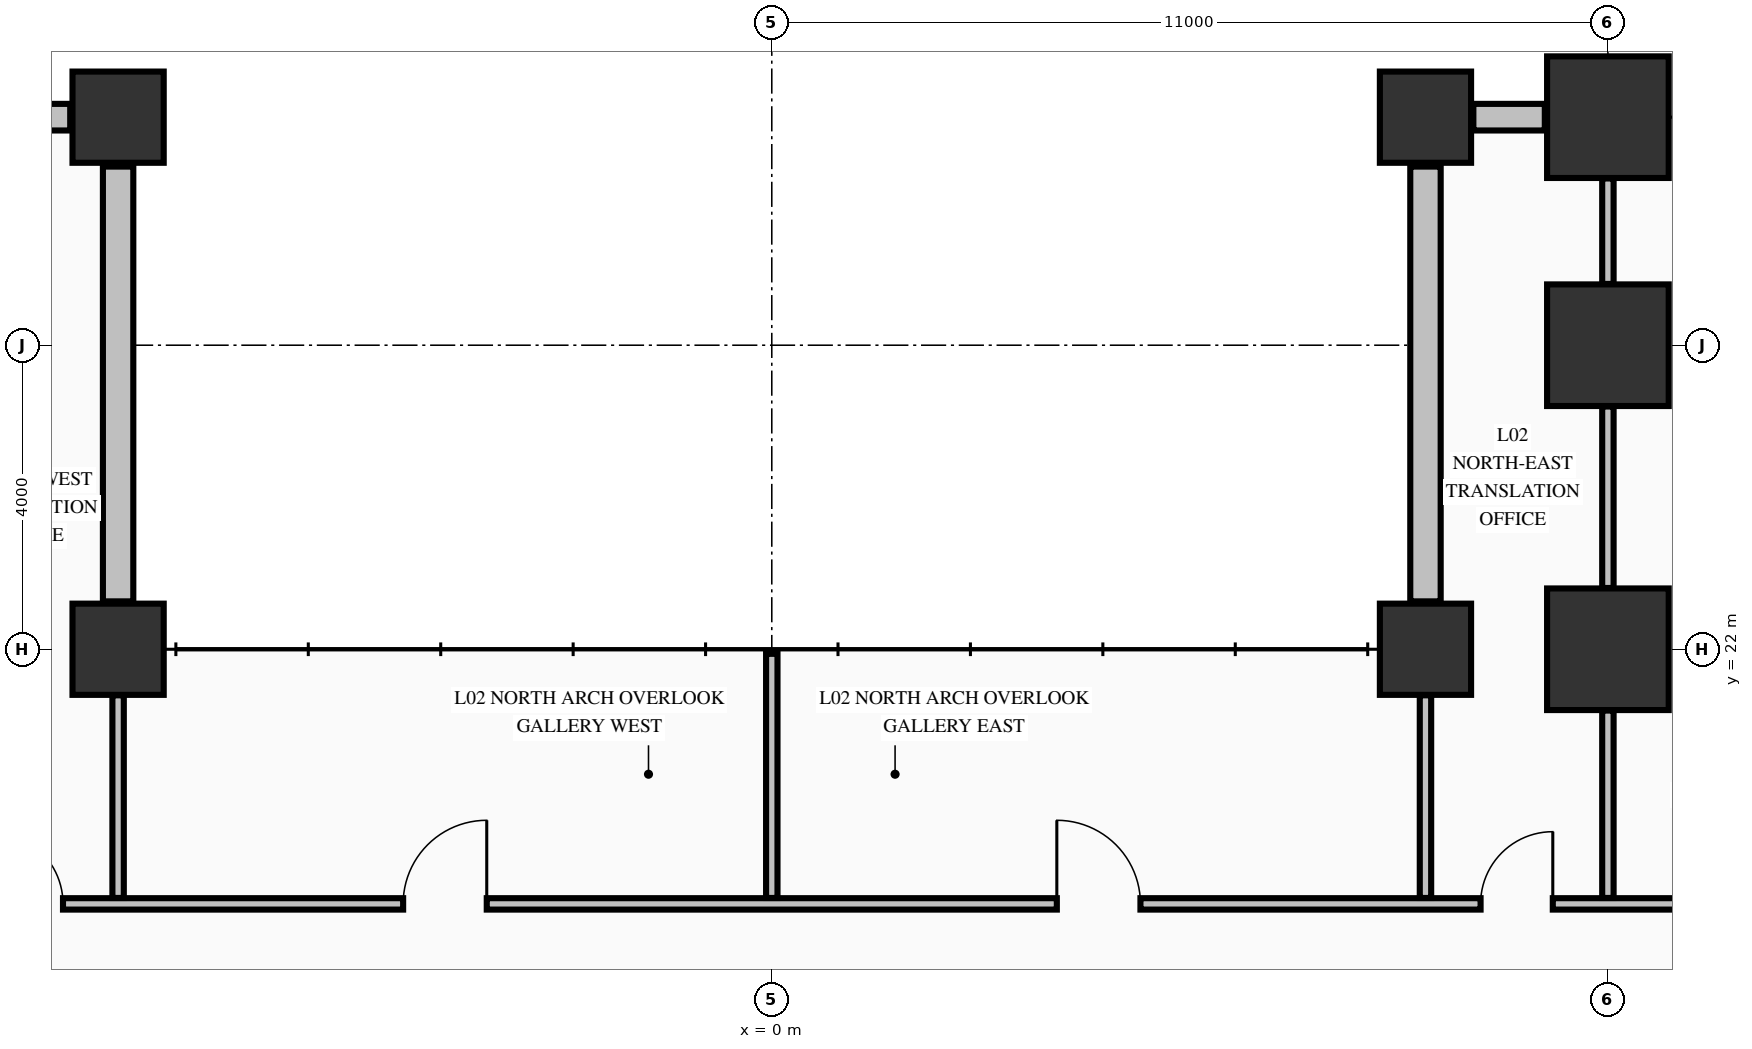
"""IFC4 building model, lengths in metres.
Left out: names, types, materials, properties, quantities, classifications, styles, units other than length and angle.
Written with IfcOpenShell. Run it as: python <this file> out.ifc"""

import sys

from ifc_helpers import new_model, si_unit, direction, frame, frame_2d, origin, origin_2d, place, context, subcontext, project, spatial, rectangle, extrude, element, fill, save


model = new_model("IFC4")
c1 = context("Model", 3, precision=1e-05, world=origin(), true_north=direction((0.0, 1.0)))
c2 = subcontext(c1, "Body", "Model", "MODEL_VIEW")
j1 = project(units=[si_unit("LENGTHUNIT", "METRE"), si_unit("PLANEANGLEUNIT", "RADIAN")], contexts=[c1])
p1 = place(None, origin())
s1 = spatial("IfcSite", under=j1, at=p1, CompositionType="ELEMENT")
p2 = place(p1, origin())
s2 = spatial("IfcBuilding", under=s1, at=p2, CompositionType="ELEMENT")
p3 = place(p2, frame((0.0, 0.0, 10.88)))
s3 = spatial("IfcBuildingStorey", under=s2, at=p3, CompositionType="ELEMENT", Elevation=10.88)
for number, where, z_axis, x_axis in (
    (1, (11.0, 22.0, 0.0), (0.0, 0.0, 1.0), (1.0, 0.0, 0.0)),
    (2, (11.0, 26.0, 0.0), (0.0, 0.0, 1.0), (1.0, 0.0, 0.0)),
    (3, (11.0, 29.0, 0.0), (0.0, 0.0, 1.0), (1.0, 0.0, 0.0)),
):
    element("IfcColumn", number, at=place(p3, frame(where, z_axis=z_axis, x_axis=x_axis)), inside=s3, PredefinedType="COLUMN", context=c2, shape_type="SweptSolid", body=[
        extrude(rectangle(XDim=1.6, YDim=1.6, at=origin_2d()), origin(), (0.0, 0.0, 1.0), 5.09),
    ])
for number, where, z_axis, x_axis in (
    (4, (-8.6, 22.0, 0.0), (0.0, 0.0, 1.0), (1.0, 0.0, 0.0)),
    (5, (8.6, 22.0, 0.0), (0.0, 0.0, 1.0), (1.0, 0.0, 0.0)),
    (6, (-8.6, 29.0, 0.0), (0.0, 0.0, 1.0), (1.0, 0.0, 0.0)),
    (7, (8.6, 29.0, 0.0), (0.0, 0.0, 1.0), (1.0, 0.0, 0.0)),
):
    element("IfcColumn", number, at=place(p3, frame(where, z_axis=z_axis, x_axis=x_axis)), inside=s3, PredefinedType="COLUMN", context=c2, shape_type="SweptSolid", body=[
        extrude(rectangle(XDim=1.2, YDim=1.2, at=origin_2d()), origin(), (0.0, 0.0, 1.0), 5.09),
    ])
for number, where, z_axis, x_axis in (
    (8, (-9.23, 29.0, 0.0), (0.0, 0.0, 1.0), (-1.0, 0.0, 0.0)),
    (9, (10.17, 29.0, 0.0), (0.0, 0.0, 1.0), (-1.0, 0.0, 0.0)),
):
    element("IfcWall", number, at=place(p3, frame(where, z_axis=z_axis, x_axis=x_axis)), inside=s3, PredefinedType="STANDARD", context=c2, shape_type="SweptSolid", body=[
        extrude(rectangle(XDim=0.94, YDim=0.35, at=frame_2d((0.47, 0.0))), origin(), (0.0, 0.0, 1.0), 4.482),
    ])
for number, where, z_axis, x_axis in (
    (10, (-8.6, 22.63, 0.0), (0.0, 0.0, 1.0), (0.0, 1.0, 0.0)),
    (11, (8.6, 28.35, 0.0), (0.0, 0.0, 1.0), (0.0, -1.0, 0.0)),
):
    element("IfcWall", number, at=place(p3, frame(where, z_axis=z_axis, x_axis=x_axis)), inside=s3, PredefinedType="STANDARD", context=c2, shape_type="SweptSolid", body=[
        extrude(rectangle(XDim=5.72, YDim=0.4, at=frame_2d((2.86, 0.0))), origin(), (0.0, 0.0, 1.0), 4.132),
    ])
p4 = place(p3, frame((-33.835, 18.65, 0.0), z_axis=(0.0, 0.0, 1.0), x_axis=(1.0, 0.0, 0.0)))
e12 = element("IfcWall", 12, at=p4, inside=s3, PredefinedType="PARTITIONING", context=c2, shape_type="SweptSolid", body=[
    extrude(rectangle(XDim=63.685, YDim=0.15, at=frame_2d((31.843, 0.0))), origin(), (0.0, 0.0, 1.0), 5.09),
])
p5 = place(p4, frame((1.285, 0.0, 0.0)))
e13 = element("IfcOpeningElement", 13, at=p5, cuts=e12, PredefinedType="OPENING", context=c2, shape_type="SweptSolid", body=[
    extrude(rectangle(XDim=1.1, YDim=2.15, at=frame_2d((0.55, 1.075))), frame((0.0, 0.085, 0.0), z_axis=(0.0, -1.0, 0.0), x_axis=(1.0, 0.0, 0.0)), (0.0, 0.0, 1.0), 0.17),
])
p6 = place(p4, frame((5.285, 0.0, 0.0)))
e14 = element("IfcOpeningElement", 14, at=p6, cuts=e12, PredefinedType="OPENING", context=c2, shape_type="SweptSolid", body=[
    extrude(rectangle(XDim=1.1, YDim=2.15, at=frame_2d((0.55, 1.075))), frame((0.0, 0.085, 0.0), z_axis=(0.0, -1.0, 0.0), x_axis=(1.0, 0.0, 0.0)), (0.0, 0.0, 1.0), 0.17),
])
p7 = place(p4, frame((10.285, 0.0, 0.0)))
e15 = element("IfcOpeningElement", 15, at=p7, cuts=e12, PredefinedType="OPENING", context=c2, shape_type="SweptSolid", body=[
    extrude(rectangle(XDim=1.1, YDim=2.15, at=frame_2d((0.55, 1.075))), frame((0.0, 0.085, 0.0), z_axis=(0.0, -1.0, 0.0), x_axis=(1.0, 0.0, 0.0)), (0.0, 0.0, 1.0), 0.17),
])
p8 = place(p4, frame((15.535, 0.0, 0.0)))
e16 = element("IfcOpeningElement", 16, at=p8, cuts=e12, PredefinedType="OPENING", context=c2, shape_type="SweptSolid", body=[
    extrude(rectangle(XDim=1.1, YDim=2.15, at=frame_2d((0.55, 1.075))), frame((0.0, 0.085, 0.0), z_axis=(0.0, -1.0, 0.0), x_axis=(1.0, 0.0, 0.0)), (0.0, 0.0, 1.0), 0.17),
])
p9 = place(p4, frame((20.035, 0.0, 0.0)))
e17 = element("IfcOpeningElement", 17, at=p9, cuts=e12, PredefinedType="OPENING", context=c2, shape_type="SweptSolid", body=[
    extrude(rectangle(XDim=1.1, YDim=2.15, at=frame_2d((0.55, 1.075))), frame((0.0, 0.085, 0.0), z_axis=(0.0, -1.0, 0.0), x_axis=(1.0, 0.0, 0.0)), (0.0, 0.0, 1.0), 0.17),
])
p10 = place(p4, frame((23.56, 0.0, 0.0)))
e18 = element("IfcOpeningElement", 18, at=p10, cuts=e12, PredefinedType="OPENING", context=c2, shape_type="SweptSolid", body=[
    extrude(rectangle(XDim=0.95, YDim=2.15, at=frame_2d((0.475, 1.075))), frame((0.0, 0.085, 0.0), z_axis=(0.0, -1.0, 0.0), x_axis=(1.0, 0.0, 0.0)), (0.0, 0.0, 1.0), 0.17),
])
p11 = place(p4, frame((28.985, 0.0, 0.0)))
e19 = element("IfcOpeningElement", 19, at=p11, cuts=e12, PredefinedType="OPENING", context=c2, shape_type="SweptSolid", body=[
    extrude(rectangle(XDim=1.1, YDim=2.15, at=frame_2d((0.55, 1.075))), frame((0.0, 0.085, 0.0), z_axis=(0.0, -1.0, 0.0), x_axis=(1.0, 0.0, 0.0)), (0.0, 0.0, 1.0), 0.17),
])
p12 = place(p4, frame((37.585, 0.0, 0.0)))
e20 = element("IfcOpeningElement", 20, at=p12, cuts=e12, PredefinedType="OPENING", context=c2, shape_type="SweptSolid", body=[
    extrude(rectangle(XDim=1.1, YDim=2.15, at=frame_2d((0.55, 1.075))), frame((0.0, 0.085, 0.0), z_axis=(0.0, -1.0, 0.0), x_axis=(1.0, 0.0, 0.0)), (0.0, 0.0, 1.0), 0.17),
])
p13 = place(p4, frame((43.16, 0.0, 0.0)))
e21 = element("IfcOpeningElement", 21, at=p13, cuts=e12, PredefinedType="OPENING", context=c2, shape_type="SweptSolid", body=[
    extrude(rectangle(XDim=0.95, YDim=2.15, at=frame_2d((0.475, 1.075))), frame((0.0, 0.085, 0.0), z_axis=(0.0, -1.0, 0.0), x_axis=(1.0, 0.0, 0.0)), (0.0, 0.0, 1.0), 0.17),
])
p14 = place(p4, frame((61.31, 0.0, 0.0)))
e22 = element("IfcOpeningElement", 22, at=p14, cuts=e12, PredefinedType="OPENING", context=c2, shape_type="SweptSolid", body=[
    extrude(rectangle(XDim=0.95, YDim=2.15, at=frame_2d((0.475, 1.075))), frame((0.0, 0.085, 0.0), z_axis=(0.0, -1.0, 0.0), x_axis=(1.0, 0.0, 0.0)), (0.0, 0.0, 1.0), 0.17),
])
p15 = place(p4, frame((47.56, 0.0, 0.0)))
e23 = element("IfcOpeningElement", 23, at=p15, cuts=e12, PredefinedType="OPENING", context=c2, shape_type="SweptSolid", body=[
    extrude(rectangle(XDim=0.95, YDim=2.15, at=frame_2d((0.475, 1.075))), frame((0.0, 0.085, 0.0), z_axis=(0.0, -1.0, 0.0), x_axis=(1.0, 0.0, 0.0)), (0.0, 0.0, 1.0), 0.17),
])
p16 = place(p4, frame((51.31, 0.0, 0.0)))
e24 = element("IfcOpeningElement", 24, at=p16, cuts=e12, PredefinedType="OPENING", context=c2, shape_type="SweptSolid", body=[
    extrude(rectangle(XDim=1.05, YDim=2.15, at=frame_2d((0.525, 1.075))), frame((0.0, 0.085, 0.0), z_axis=(0.0, -1.0, 0.0), x_axis=(1.0, 0.0, 0.0)), (0.0, 0.0, 1.0), 0.17),
])
p17 = place(p4, frame((56.06, 0.0, 0.0)))
e25 = element("IfcOpeningElement", 25, at=p17, cuts=e12, PredefinedType="OPENING", context=c2, shape_type="SweptSolid", body=[
    extrude(rectangle(XDim=0.95, YDim=2.15, at=frame_2d((0.475, 1.075))), frame((0.0, 0.085, 0.0), z_axis=(0.0, -1.0, 0.0), x_axis=(1.0, 0.0, 0.0)), (0.0, 0.0, 1.0), 0.17),
])
p18 = place(p4, frame((58.535, 0.0, 0.0)))
e26 = element("IfcOpeningElement", 26, at=p18, cuts=e12, PredefinedType="OPENING", context=c2, shape_type="SweptSolid", body=[
    extrude(rectangle(XDim=0.9, YDim=2.15, at=frame_2d((0.45, 1.075))), frame((0.0, 0.085, 0.0), z_axis=(0.0, -1.0, 0.0), x_axis=(1.0, 0.0, 0.0)), (0.0, 0.0, 1.0), 0.17),
])
p19 = place(p3, frame((-8.6, 18.728, 0.0), z_axis=(0.0, 0.0, 1.0), x_axis=(0.0, 1.0, 0.0)))
e27 = element("IfcWall", 27, at=p19, inside=s3, PredefinedType="PARTITIONING", context=c2, shape_type="SweptSolid", body=[
    extrude(rectangle(XDim=2.666, YDim=0.15, at=frame_2d((1.333, 0.0))), origin(), (0.0, 0.0, 1.0), 4.132),
])
p20 = place(p3, frame((0.0, 18.728, 0.0), z_axis=(0.0, 0.0, 1.0), x_axis=(0.0, 1.0, 0.0)))
e28 = element("IfcWall", 28, at=p20, inside=s3, PredefinedType="PARTITIONING", context=c2, shape_type="SweptSolid", body=[
    extrude(rectangle(XDim=3.212, YDim=0.15, at=frame_2d((1.606, 0.0))), origin(), (0.0, 0.0, 1.0), 5.09),
])
p21 = place(p3, frame((8.6, 18.728, 0.0), z_axis=(0.0, 0.0, 1.0), x_axis=(0.0, 1.0, 0.0)))
e29 = element("IfcWall", 29, at=p21, inside=s3, PredefinedType="PARTITIONING", context=c2, shape_type="SweptSolid", body=[
    extrude(rectangle(XDim=2.666, YDim=0.15, at=frame_2d((1.333, 0.0))), origin(), (0.0, 0.0, 1.0), 4.132),
])
p22 = place(p3, frame((11.0, 18.728, 0.0), z_axis=(0.0, 0.0, 1.0), x_axis=(0.0, 1.0, 0.0)))
e30 = element("IfcWall", 30, at=p22, inside=s3, PredefinedType="PARTITIONING", context=c2, shape_type="SweptSolid", body=[
    extrude(rectangle(XDim=2.466, YDim=0.15, at=frame_2d((1.233, 0.0))), origin(), (0.0, 0.0, 1.0), 4.132),
])
p23 = place(p3, frame((11.0, 22.806, 0.0), z_axis=(0.0, 0.0, 1.0), x_axis=(0.0, 1.0, 0.0)))
e31 = element("IfcWall", 31, at=p23, inside=s3, PredefinedType="PARTITIONING", context=c2, shape_type="SweptSolid", body=[
    extrude(rectangle(XDim=2.388, YDim=0.15, at=frame_2d((1.194, 0.0))), origin(), (0.0, 0.0, 1.0), 4.132),
])
p24 = place(p3, frame((11.0, 26.806, 0.0), z_axis=(0.0, 0.0, 1.0), x_axis=(0.0, 1.0, 0.0)))
e32 = element("IfcWall", 32, at=p24, inside=s3, PredefinedType="PARTITIONING", context=c2, shape_type="SweptSolid", body=[
    extrude(rectangle(XDim=1.388, YDim=0.15, at=frame_2d((0.694, 0.0))), origin(), (0.0, 0.0, 1.0), 4.132),
])
p25 = place(p10, origin())
e33 = element("IfcDoor", 33, at=p25, inside=s3, OperationType="SINGLE_SWING_LEFT", PredefinedType="DOOR", context=c2, shape_type="SweptSolid", body=[
    extrude(rectangle(XDim=0.95, YDim=2.15, at=frame_2d((0.475, 1.075))), frame((0.0, 0.025, 0.0), z_axis=(0.0, -1.0, 0.0), x_axis=(1.0, 0.0, 0.0)), (0.0, 0.0, 1.0), 0.05),
])
fill(e18, e33)
p26 = place(p11, origin())
e34 = element("IfcDoor", 34, at=p26, inside=s3, OperationType="SINGLE_SWING_RIGHT", PredefinedType="DOOR", context=c2, shape_type="SweptSolid", body=[
    extrude(rectangle(XDim=1.1, YDim=2.15, at=frame_2d((0.55, 1.075))), frame((0.0, 0.025, 0.0), z_axis=(0.0, -1.0, 0.0), x_axis=(1.0, 0.0, 0.0)), (0.0, 0.0, 1.0), 0.05),
])
fill(e19, e34)
p27 = place(p12, origin())
e35 = element("IfcDoor", 35, at=p27, inside=s3, OperationType="SINGLE_SWING_LEFT", PredefinedType="DOOR", context=c2, shape_type="SweptSolid", body=[
    extrude(rectangle(XDim=1.1, YDim=2.15, at=frame_2d((0.55, 1.075))), frame((0.0, 0.025, 0.0), z_axis=(0.0, -1.0, 0.0), x_axis=(1.0, 0.0, 0.0)), (0.0, 0.0, 1.0), 0.05),
])
fill(e20, e35)
p28 = place(p13, origin())
e36 = element("IfcDoor", 36, at=p28, inside=s3, OperationType="SINGLE_SWING_RIGHT", PredefinedType="DOOR", context=c2, shape_type="SweptSolid", body=[
    extrude(rectangle(XDim=0.95, YDim=2.15, at=frame_2d((0.475, 1.075))), frame((0.0, 0.025, 0.0), z_axis=(0.0, -1.0, 0.0), x_axis=(1.0, 0.0, 0.0)), (0.0, 0.0, 1.0), 0.05),
])
fill(e21, e36)
save(model, sys.argv[1])
